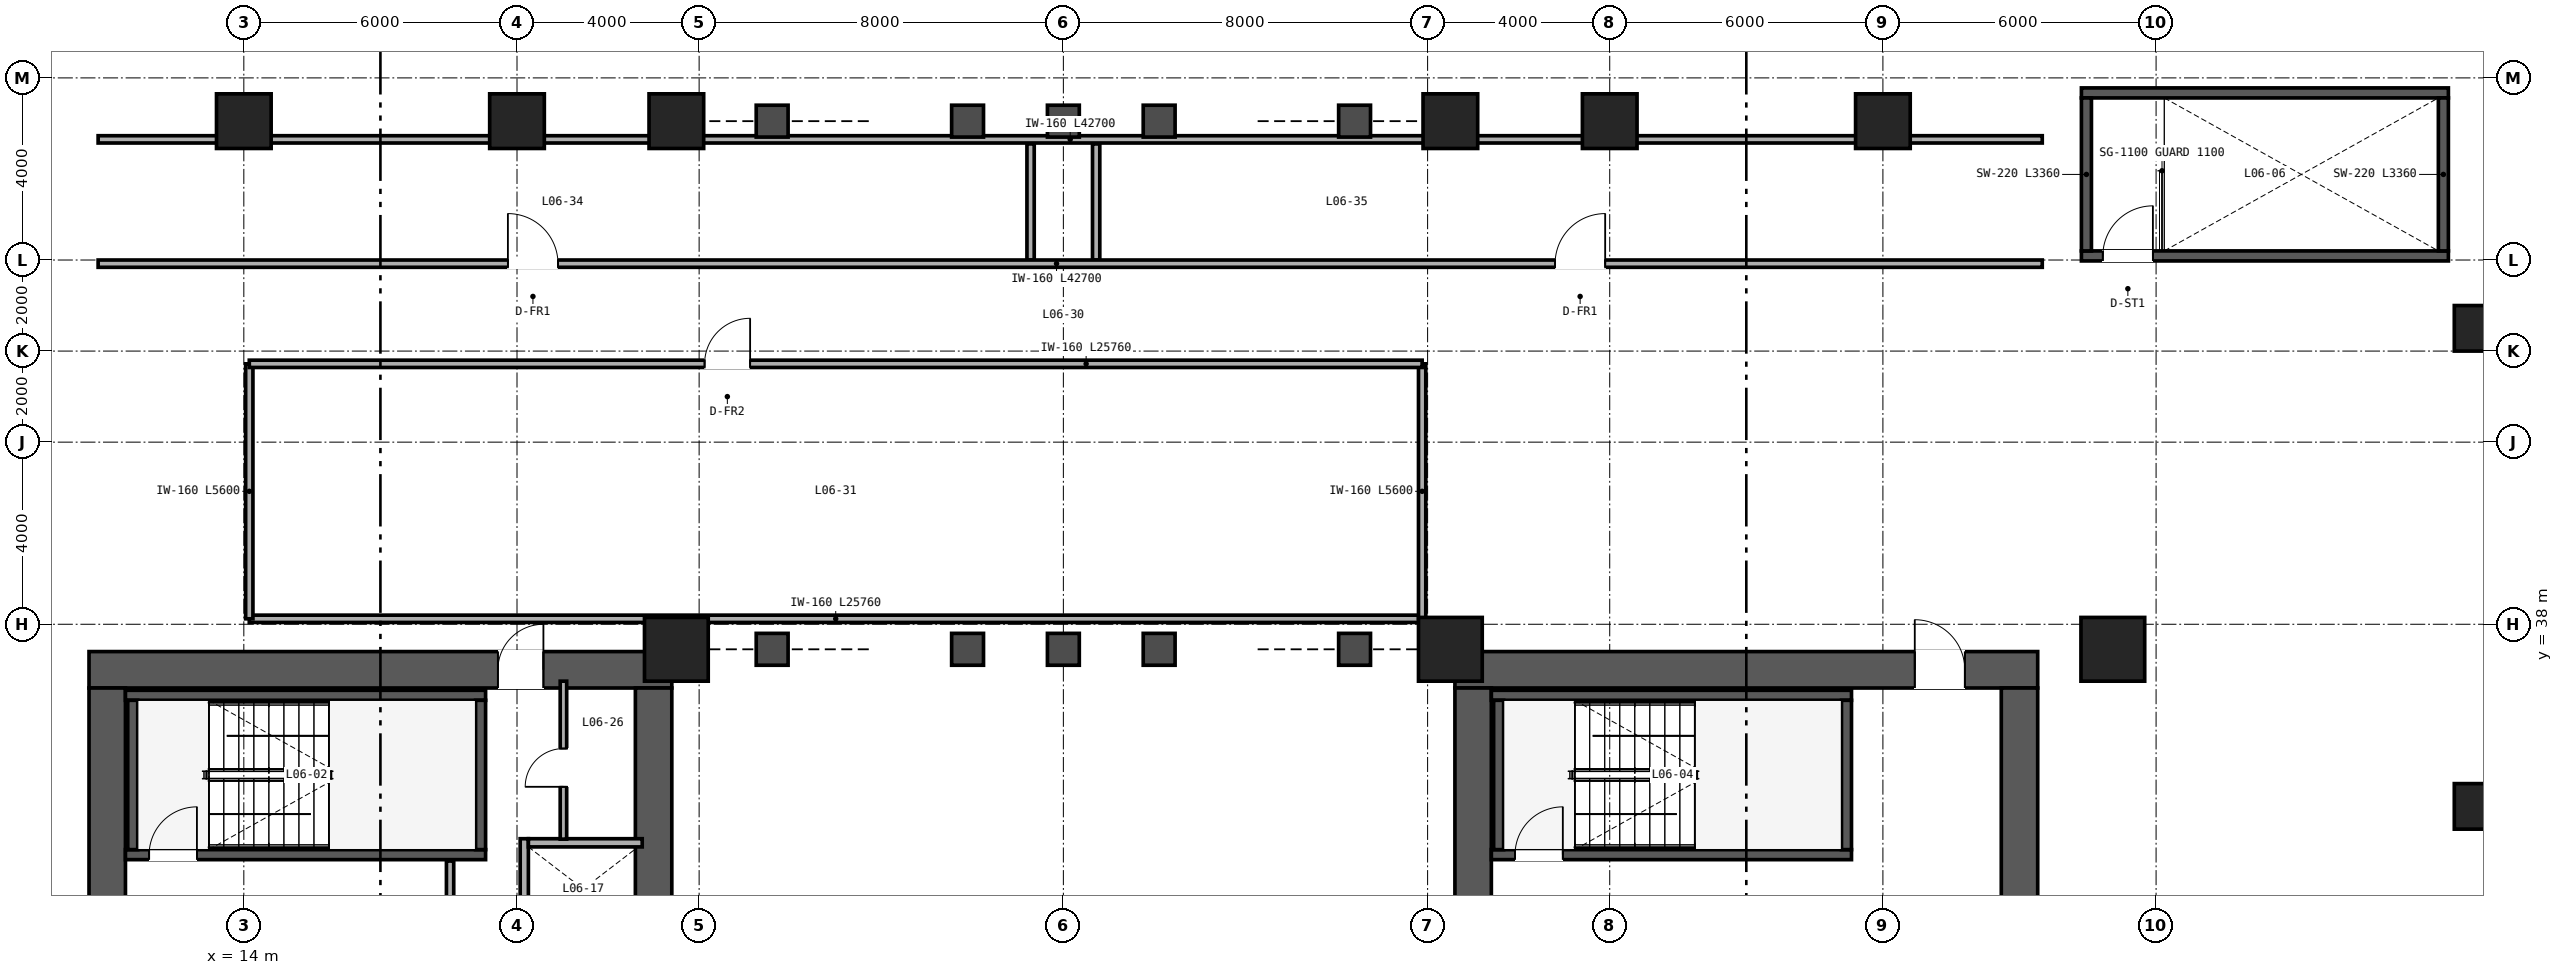
"""IFC4 building model, lengths in metres.
Left out: names, types, materials, properties, quantities, classifications, styles, units other than length and angle.
Written with IfcOpenShell. Run it as: python <this file> out.ifc"""

import sys

from ifc_helpers import new_model, si_unit, direction, frame, frame_2d, origin, origin_2d, place, context, subcontext, project, spatial, rectangle, extrude, source, transform, mapped, element, fill, save


model = new_model("IFC4")
c1 = context("Model", 3, precision=1e-05, world=origin(), true_north=direction((0.0, 1.0)))
c2 = subcontext(c1, "Body", "Model", "MODEL_VIEW")
j1 = project(units=[si_unit("LENGTHUNIT", "METRE"), si_unit("PLANEANGLEUNIT", "RADIAN")], contexts=[c1])
p1 = place(None, origin())
s1 = spatial("IfcSite", under=j1, at=p1, CompositionType="ELEMENT")
p2 = place(p1, origin())
s2 = spatial("IfcBuilding", under=s1, at=p2, CompositionType="ELEMENT")
p3 = place(p2, frame((0.0, 0.0, 28.8)))
s3 = spatial("IfcBuildingStorey", under=s2, at=p3, CompositionType="ELEMENT", Elevation=28.8)
p4 = place(p3, frame((10.6, 37.0, 0.0), z_axis=(0.0, 0.0, 1.0), x_axis=(1.0, 0.0, 0.0)))
e1 = element("IfcWall", 1, at=p4, inside=s3, PredefinedType="SHEAR", context=c2, shape_type="SweptSolid", body=[
    extrude(rectangle(XDim=12.8, YDim=0.8, at=frame_2d((6.4, 0.0))), origin(), (0.0, 0.0, 1.0), 5.75),
])
p5 = place(p4, frame((8.98, 0.0, 0.0)))
e2 = element("IfcOpeningElement", 2, at=p5, cuts=e1, PredefinedType="OPENING", context=c2, shape_type="SweptSolid", body=[
    extrude(rectangle(XDim=1.0, YDim=2.15, at=frame_2d((0.5, 1.075))), frame((0.0, 0.41, 0.0), z_axis=(0.0, -1.0, 0.0), x_axis=(1.0, 0.0, 0.0)), (0.0, 0.0, 1.0), 0.82),
])
for number, where, z_axis, x_axis in (
    (3, (11.0, 15.4, 0.0), (0.0, 0.0, 1.0), (0.0, 1.0, 0.0)),
    (4, (23.0, 15.4, 0.0), (0.0, 0.0, 1.0), (0.0, 1.0, 0.0)),
):
    element("IfcWall", number, at=place(p3, frame(where, z_axis=z_axis, x_axis=x_axis)), inside=s3, PredefinedType="SHEAR", context=c2, shape_type="SweptSolid", body=[
        extrude(rectangle(XDim=21.2, YDim=0.8, at=frame_2d((10.6, 0.0))), origin(), (0.0, 0.0, 1.0), 5.75),
    ])
p6 = place(p3, frame((40.6, 37.0, 0.0), z_axis=(0.0, 0.0, 1.0), x_axis=(1.0, 0.0, 0.0)))
e5 = element("IfcWall", 5, at=p6, inside=s3, PredefinedType="SHEAR", context=c2, shape_type="SweptSolid", body=[
    extrude(rectangle(XDim=12.8, YDim=0.8, at=frame_2d((6.4, 0.0))), origin(), (0.0, 0.0, 1.0), 5.75),
])
p7 = place(p6, frame((10.1, 0.0, 0.0)))
e6 = element("IfcOpeningElement", 6, at=p7, cuts=e5, PredefinedType="OPENING", context=c2, shape_type="SweptSolid", body=[
    extrude(rectangle(XDim=1.1, YDim=2.15, at=frame_2d((0.55, 1.075))), frame((0.0, 0.41, 0.0), z_axis=(0.0, -1.0, 0.0), x_axis=(1.0, 0.0, 0.0)), (0.0, 0.0, 1.0), 0.82),
])
for number, where, z_axis, x_axis in (
    (7, (41.0, 15.4, 0.0), (0.0, 0.0, 1.0), (0.0, 1.0, 0.0)),
    (8, (53.0, 15.4, 0.0), (0.0, 0.0, 1.0), (0.0, 1.0, 0.0)),
):
    element("IfcWall", number, at=place(p3, frame(where, z_axis=z_axis, x_axis=x_axis)), inside=s3, PredefinedType="SHEAR", context=c2, shape_type="SweptSolid", body=[
        extrude(rectangle(XDim=21.2, YDim=0.8, at=frame_2d((10.6, 0.0))), origin(), (0.0, 0.0, 1.0), 5.75),
    ])
p8 = place(p3, frame((11.4, 32.94, 0.0), z_axis=(0.0, 0.0, 1.0), x_axis=(1.0, 0.0, 0.0)))
e9 = element("IfcWall", 9, at=p8, inside=s3, PredefinedType="SHEAR", context=c2, shape_type="SweptSolid", body=[
    extrude(rectangle(XDim=7.91, YDim=0.22, at=frame_2d((3.955, 0.0))), origin(), (0.0, 0.0, 1.0), 5.8),
])
p9 = place(p8, frame((0.52, 0.0, 0.0)))
e10 = element("IfcOpeningElement", 10, at=p9, cuts=e9, PredefinedType="OPENING", context=c2, shape_type="SweptSolid", body=[
    extrude(rectangle(XDim=1.05, YDim=2.15, at=frame_2d((0.525, 1.075))), frame((0.0, 0.12, 0.0), z_axis=(0.0, -1.0, 0.0), x_axis=(1.0, 0.0, 0.0)), (0.0, 0.0, 1.0), 0.24),
])
p10 = place(p3, frame((11.4, 36.44, 0.0), z_axis=(0.0, 0.0, 1.0), x_axis=(1.0, 0.0, 0.0)))
e11 = element("IfcWall", 11, at=p10, inside=s3, PredefinedType="SHEAR", context=c2, shape_type="SweptSolid", body=[
    extrude(rectangle(XDim=7.91, YDim=0.22, at=frame_2d((3.955, 0.0))), origin(), (0.0, 0.0, 1.0), 5.8),
])
for number, where, z_axis, x_axis in (
    (12, (11.56, 33.05, 0.0), (0.0, 0.0, 1.0), (0.0, 1.0, 0.0)),
    (13, (19.2, 33.05, 0.0), (0.0, 0.0, 1.0), (0.0, 1.0, 0.0)),
):
    element("IfcWall", number, at=place(p3, frame(where, z_axis=z_axis, x_axis=x_axis)), inside=s3, PredefinedType="SHEAR", context=c2, shape_type="SweptSolid", body=[
        extrude(rectangle(XDim=3.28, YDim=0.22, at=frame_2d((1.64, 0.0))), origin(), (0.0, 0.0, 1.0), 5.8),
    ])
p11 = place(p3, frame((41.4, 32.94, 0.0), z_axis=(0.0, 0.0, 1.0), x_axis=(1.0, 0.0, 0.0)))
e14 = element("IfcWall", 14, at=p11, inside=s3, PredefinedType="SHEAR", context=c2, shape_type="SweptSolid", body=[
    extrude(rectangle(XDim=7.91, YDim=0.22, at=frame_2d((3.955, 0.0))), origin(), (0.0, 0.0, 1.0), 5.8),
])
p12 = place(p11, frame((0.52, 0.0, 0.0)))
e15 = element("IfcOpeningElement", 15, at=p12, cuts=e14, PredefinedType="OPENING", context=c2, shape_type="SweptSolid", body=[
    extrude(rectangle(XDim=1.05, YDim=2.15, at=frame_2d((0.525, 1.075))), frame((0.0, 0.12, 0.0), z_axis=(0.0, -1.0, 0.0), x_axis=(1.0, 0.0, 0.0)), (0.0, 0.0, 1.0), 0.24),
])
p13 = place(p3, frame((41.4, 36.44, 0.0), z_axis=(0.0, 0.0, 1.0), x_axis=(1.0, 0.0, 0.0)))
e16 = element("IfcWall", 16, at=p13, inside=s3, PredefinedType="SHEAR", context=c2, shape_type="SweptSolid", body=[
    extrude(rectangle(XDim=7.91, YDim=0.22, at=frame_2d((3.955, 0.0))), origin(), (0.0, 0.0, 1.0), 5.8),
])
for number, where, z_axis, x_axis in (
    (17, (41.56, 33.05, 0.0), (0.0, 0.0, 1.0), (0.0, 1.0, 0.0)),
    (18, (49.2, 33.05, 0.0), (0.0, 0.0, 1.0), (0.0, 1.0, 0.0)),
):
    element("IfcWall", number, at=place(p3, frame(where, z_axis=z_axis, x_axis=x_axis)), inside=s3, PredefinedType="SHEAR", context=c2, shape_type="SweptSolid", body=[
        extrude(rectangle(XDim=3.28, YDim=0.22, at=frame_2d((1.64, 0.0))), origin(), (0.0, 0.0, 1.0), 5.8),
    ])
p14 = place(p3, frame((54.36, 46.09, 0.0), z_axis=(0.0, 0.0, 1.0), x_axis=(1.0, 0.0, 0.0)))
e19 = element("IfcWall", 19, at=p14, inside=s3, PredefinedType="SHEAR", context=c2, shape_type="SweptSolid", body=[
    extrude(rectangle(XDim=8.06, YDim=0.22, at=frame_2d((4.03, 0.0))), origin(), (0.0, 0.0, 1.0), 5.8),
])
p15 = place(p14, frame((0.47, 0.0, 0.0)))
e20 = element("IfcOpeningElement", 20, at=p15, cuts=e19, PredefinedType="OPENING", context=c2, shape_type="SweptSolid", body=[
    extrude(rectangle(XDim=1.1, YDim=2.15, at=frame_2d((0.55, 1.075))), frame((0.0, 0.12, 0.0), z_axis=(0.0, -1.0, 0.0), x_axis=(1.0, 0.0, 0.0)), (0.0, 0.0, 1.0), 0.24),
])
p16 = place(p3, frame((54.36, 49.67, 0.0), z_axis=(0.0, 0.0, 1.0), x_axis=(1.0, 0.0, 0.0)))
e21 = element("IfcWall", 21, at=p16, inside=s3, PredefinedType="SHEAR", context=c2, shape_type="SweptSolid", body=[
    extrude(rectangle(XDim=8.06, YDim=0.22, at=frame_2d((4.03, 0.0))), origin(), (0.0, 0.0, 1.0), 5.8),
])
for number, where, z_axis, x_axis in (
    (22, (54.47, 46.2, 0.0), (0.0, 0.0, 1.0), (0.0, 1.0, 0.0)),
    (23, (62.31, 46.2, 0.0), (0.0, 0.0, 1.0), (0.0, 1.0, 0.0)),
):
    element("IfcWall", number, at=place(p3, frame(where, z_axis=z_axis, x_axis=x_axis)), inside=s3, PredefinedType="SHEAR", context=c2, shape_type="SweptSolid", body=[
        extrude(rectangle(XDim=3.36, YDim=0.22, at=frame_2d((1.68, 0.0))), origin(), (0.0, 0.0, 1.0), 5.8),
    ])
m1 = source(origin(), c2, "Body", "SweptSolid", [
    extrude(rectangle(XDim=1.0, YDim=1.0, at=origin_2d()), origin(), (0.0, 0.0, 1.0), 5.75),
])
for number, where, z_axis, x_axis in (
    (24, (63.05, 34.0, 0.0), (0.0, 0.0, 1.0), (1.0, 0.0, 0.0)),
    (25, (63.05, 44.5, 0.0), (0.0, 0.0, 1.0), (1.0, 0.0, 0.0)),
):
    element("IfcColumn", number, at=place(p3, frame(where, z_axis=z_axis, x_axis=x_axis)), inside=s3, PredefinedType="COLUMN", context=c2, shape_type="MappedRepresentation", body=[
        mapped(m1, transform((0.0, 0.0, 0.0), scale=1.0)),
    ])
m2 = source(origin(), c2, "Body", "SweptSolid", [
    extrude(rectangle(XDim=1.4, YDim=1.4, at=origin_2d()), origin(), (0.0, 0.0, 1.0), 5.75),
])
for number, where, z_axis, x_axis in (
    (26, (23.5, 37.45, 0.0), (0.0, 0.0, 1.0), (1.0, 0.0, 0.0)),
    (27, (40.5, 37.45, 0.0), (0.0, 0.0, 1.0), (1.0, 0.0, 0.0)),
    (28, (55.05, 37.45, 0.0), (0.0, 0.0, 1.0), (1.0, 0.0, 0.0)),
):
    element("IfcColumn", number, at=place(p3, frame(where, z_axis=z_axis, x_axis=x_axis)), inside=s3, PredefinedType="COLUMN", context=c2, shape_type="MappedRepresentation", body=[
        mapped(m2, transform((0.0, 0.0, 0.0), scale=1.0)),
    ])
m3 = source(origin(), c2, "Body", "SweptSolid", [
    extrude(rectangle(XDim=1.2, YDim=1.2, at=origin_2d()), origin(), (0.0, 0.0, 1.0), 5.75),
])
for number, where, z_axis, x_axis in (
    (29, (14.0, 49.05, 0.0), (0.0, 0.0, 1.0), (1.0, 0.0, 0.0)),
    (30, (20.0, 49.05, 0.0), (0.0, 0.0, 1.0), (1.0, 0.0, 0.0)),
    (31, (23.5, 49.05, 0.0), (0.0, 0.0, 1.0), (1.0, 0.0, 0.0)),
    (32, (40.5, 49.05, 0.0), (0.0, 0.0, 1.0), (1.0, 0.0, 0.0)),
    (33, (44.0, 49.05, 0.0), (0.0, 0.0, 1.0), (1.0, 0.0, 0.0)),
    (34, (50.0, 49.05, 0.0), (0.0, 0.0, 1.0), (1.0, 0.0, 0.0)),
):
    element("IfcColumn", number, at=place(p3, frame(where, z_axis=z_axis, x_axis=x_axis)), inside=s3, PredefinedType="COLUMN", context=c2, shape_type="MappedRepresentation", body=[
        mapped(m3, transform((0.0, 0.0, 0.0), scale=1.0)),
    ])
p17 = place(p3, frame((20.16, 29.0, 0.0), z_axis=(0.0, 0.0, 1.0), x_axis=(0.0, 1.0, 0.0)))
e35 = element("IfcWall", 35, at=p17, inside=s3, PredefinedType="SOLIDWALL", context=c2, shape_type="SweptSolid", body=[
    extrude(rectangle(XDim=4.29, YDim=0.18, at=frame_2d((2.145, 0.0))), origin(), (0.0, 0.0, 1.0), 5.75),
])
p18 = place(p3, frame((20.25, 33.2, 0.0), z_axis=(0.0, 0.0, 1.0), x_axis=(1.0, 0.0, 0.0)))
e36 = element("IfcWall", 36, at=p18, inside=s3, PredefinedType="SOLIDWALL", context=c2, shape_type="SweptSolid", body=[
    extrude(rectangle(XDim=2.5, YDim=0.18, at=frame_2d((1.25, 0.0))), origin(), (0.0, 0.0, 1.0), 5.75),
])
p19 = place(p3, frame((18.53, 28.9, 0.0), z_axis=(0.0, 0.0, 1.0), x_axis=(0.0, 1.0, 0.0)))
e37 = element("IfcWall", 37, at=p19, inside=s3, PredefinedType="PARTITIONING", context=c2, shape_type="SweptSolid", body=[
    extrude(rectangle(XDim=3.9, YDim=0.16, at=frame_2d((1.95, 0.0))), origin(), (0.0, 0.0, 1.0), 5.75),
])
p20 = place(p19, frame((1.5, 0.0, 0.0)))
e38 = element("IfcOpeningElement", 38, at=p20, cuts=e37, PredefinedType="OPENING", context=c2, shape_type="SweptSolid", body=[
    extrude(rectangle(XDim=1.0, YDim=2.15, at=frame_2d((0.5, 1.075))), frame((0.0, 0.09, 0.0), z_axis=(0.0, -1.0, 0.0), x_axis=(1.0, 0.0, 0.0)), (0.0, 0.0, 1.0), 0.18),
])
p21 = place(p3, frame((21.02, 33.28, 0.0), z_axis=(0.0, 0.0, 1.0), x_axis=(0.0, 1.0, 0.0)))
e39 = element("IfcWall", 39, at=p21, inside=s3, PredefinedType="PARTITIONING", context=c2, shape_type="SweptSolid", body=[
    extrude(rectangle(XDim=3.47, YDim=0.142, at=frame_2d((1.735, 0.0))), origin(), (0.0, 0.0, 1.0), 5.75),
])
p22 = place(p21, frame((1.15, 0.0, 0.0)))
e40 = element("IfcOpeningElement", 40, at=p22, cuts=e39, PredefinedType="OPENING", context=c2, shape_type="SweptSolid", body=[
    extrude(rectangle(XDim=0.84, YDim=2.1, at=frame_2d((0.42, 1.05))), frame((0.0, 0.081, 0.0), z_axis=(0.0, -1.0, 0.0), x_axis=(1.0, 0.0, 0.0)), (0.0, 0.0, 1.0), 0.162),
])
p23 = place(p3, frame((14.12, 38.12, 0.0), z_axis=(0.0, 0.0, 1.0), x_axis=(1.0, 0.0, 0.0)))
e41 = element("IfcWall", 41, at=p23, inside=s3, PredefinedType="PARTITIONING", context=c2, shape_type="SweptSolid", body=[
    extrude(rectangle(XDim=25.76, YDim=0.16, at=frame_2d((12.88, 0.0))), origin(), (0.0, 0.0, 1.0), 4.971),
])
for number, where, z_axis, x_axis in (
    (42, (14.12, 38.12, 0.0), (0.0, 0.0, 1.0), (0.0, 1.0, 0.0)),
    (43, (39.88, 38.12, 0.0), (0.0, 0.0, 1.0), (0.0, 1.0, 0.0)),
):
    element("IfcWall", number, at=place(p3, frame(where, z_axis=z_axis, x_axis=x_axis)), inside=s3, PredefinedType="PARTITIONING", context=c2, shape_type="SweptSolid", body=[
        extrude(rectangle(XDim=5.6, YDim=0.16, at=frame_2d((2.8, 0.0))), origin(), (0.0, 0.0, 1.0), 5.75),
    ])
p24 = place(p3, frame((14.12, 43.72, 0.0), z_axis=(0.0, 0.0, 1.0), x_axis=(1.0, 0.0, 0.0)))
e44 = element("IfcWall", 44, at=p24, inside=s3, PredefinedType="PARTITIONING", context=c2, shape_type="SweptSolid", body=[
    extrude(rectangle(XDim=25.76, YDim=0.16, at=frame_2d((12.88, 0.0))), origin(), (0.0, 0.0, 1.0), 4.971),
])
p25 = place(p24, frame((10.0, 0.0, 0.0)))
e45 = element("IfcOpeningElement", 45, at=p25, cuts=e44, PredefinedType="OPENING", context=c2, shape_type="SweptSolid", body=[
    extrude(rectangle(XDim=1.0, YDim=2.15, at=frame_2d((0.5, 1.075))), frame((0.0, 0.09, 0.0), z_axis=(0.0, -1.0, 0.0), x_axis=(1.0, 0.0, 0.0)), (0.0, 0.0, 1.0), 0.18),
])
p26 = place(p3, frame((10.8, 48.65, 0.0), z_axis=(0.0, 0.0, 1.0), x_axis=(1.0, 0.0, 0.0)))
e46 = element("IfcWall", 46, at=p26, inside=s3, PredefinedType="PARTITIONING", context=c2, shape_type="SweptSolid", body=[
    extrude(rectangle(XDim=42.7, YDim=0.16, at=frame_2d((21.35, 0.0))), origin(), (0.0, 0.0, 1.0), 4.971),
])
for number, where, z_axis, x_axis in (
    (47, (31.28, 46.0, 0.0), (0.0, 0.0, 1.0), (0.0, 1.0, 0.0)),
    (48, (32.72, 46.0, 0.0), (0.0, 0.0, 1.0), (0.0, 1.0, 0.0)),
):
    element("IfcWall", number, at=place(p3, frame(where, z_axis=z_axis, x_axis=x_axis)), inside=s3, PredefinedType="PARTITIONING", context=c2, shape_type="SweptSolid", body=[
        extrude(rectangle(XDim=2.55, YDim=0.16, at=frame_2d((1.275, 0.0))), origin(), (0.0, 0.0, 1.0), 5.75),
    ])
p27 = place(p3, frame((10.8, 45.92, 0.0), z_axis=(0.0, 0.0, 1.0), x_axis=(1.0, 0.0, 0.0)))
e49 = element("IfcWall", 49, at=p27, inside=s3, PredefinedType="PARTITIONING", context=c2, shape_type="SweptSolid", body=[
    extrude(rectangle(XDim=42.7, YDim=0.16, at=frame_2d((21.35, 0.0))), origin(), (0.0, 0.0, 1.0), 4.971),
])
p28 = place(p27, frame((9.0, 0.0, 0.0)))
e50 = element("IfcOpeningElement", 50, at=p28, cuts=e49, PredefinedType="OPENING", context=c2, shape_type="SweptSolid", body=[
    extrude(rectangle(XDim=1.1, YDim=2.15, at=frame_2d((0.55, 1.075))), frame((0.0, 0.09, 0.0), z_axis=(0.0, -1.0, 0.0), x_axis=(1.0, 0.0, 0.0)), (0.0, 0.0, 1.0), 0.18),
])
p29 = place(p27, frame((32.0, 0.0, 0.0)))
e51 = element("IfcOpeningElement", 51, at=p29, cuts=e49, PredefinedType="OPENING", context=c2, shape_type="SweptSolid", body=[
    extrude(rectangle(XDim=1.1, YDim=2.15, at=frame_2d((0.55, 1.075))), frame((0.0, 0.09, 0.0), z_axis=(0.0, -1.0, 0.0), x_axis=(1.0, 0.0, 0.0)), (0.0, 0.0, 1.0), 0.18),
])
m4 = source(origin(), c2, "Body", "SweptSolid", [
    extrude(rectangle(XDim=1.05, YDim=2.15, at=frame_2d((0.525, 1.075))), frame((0.0, 0.025, 0.0), z_axis=(0.0, -1.0, 0.0), x_axis=(1.0, 0.0, 0.0)), (0.0, 0.0, 1.0), 0.05),
])
p30 = place(p9, origin())
e52 = element("IfcDoor", 52, at=p30, inside=s3, OperationType="SINGLE_SWING_RIGHT", PredefinedType="DOOR", context=c2, shape_type="MappedRepresentation", body=[
    mapped(m4, transform((0.0, 0.0, 0.0), scale=1.0)),
])
fill(e10, e52)
p31 = place(p12, origin())
e53 = element("IfcDoor", 53, at=p31, inside=s3, OperationType="SINGLE_SWING_RIGHT", PredefinedType="DOOR", context=c2, shape_type="MappedRepresentation", body=[
    mapped(m4, transform((0.0, 0.0, 0.0), scale=1.0)),
])
fill(e15, e53)
m5 = source(origin(), c2, "Body", "SweptSolid", [
    extrude(rectangle(XDim=1.1, YDim=2.15, at=frame_2d((0.55, 1.075))), frame((0.0, 0.025, 0.0), z_axis=(0.0, -1.0, 0.0), x_axis=(1.0, 0.0, 0.0)), (0.0, 0.0, 1.0), 0.05),
])
p32 = place(p15, origin())
e54 = element("IfcDoor", 54, at=p32, inside=s3, OperationType="SINGLE_SWING_RIGHT", PredefinedType="DOOR", context=c2, shape_type="MappedRepresentation", body=[
    mapped(m5, transform((0.0, 0.0, 0.0), scale=1.0)),
])
fill(e20, e54)
m6 = source(origin(), c2, "Body", "SweptSolid", [
    extrude(rectangle(XDim=0.84, YDim=2.1, at=frame_2d((0.42, 1.05))), frame((0.0, 0.025, 0.0), z_axis=(0.0, -1.0, 0.0), x_axis=(1.0, 0.0, 0.0)), (0.0, 0.0, 1.0), 0.05),
])
p33 = place(p22, origin())
e55 = element("IfcDoor", 55, at=p33, inside=s3, OperationType="SINGLE_SWING_LEFT", PredefinedType="DOOR", context=c2, shape_type="MappedRepresentation", body=[
    mapped(m6, transform((0.0, 0.0, 0.0), scale=1.0)),
])
fill(e40, e55)
m7 = source(origin(), c2, "Body", "SweptSolid", [
    extrude(rectangle(XDim=1.0, YDim=2.15, at=frame_2d((0.5, 1.075))), frame((0.0, 0.025, 0.0), z_axis=(0.0, -1.0, 0.0), x_axis=(1.0, 0.0, 0.0)), (0.0, 0.0, 1.0), 0.05),
])
p34 = place(p5, origin())
e56 = element("IfcDoor", 56, at=p34, inside=s3, OperationType="SINGLE_SWING_RIGHT", PredefinedType="DOOR", context=c2, shape_type="MappedRepresentation", body=[
    mapped(m7, transform((0.0, 0.0, 0.0), scale=1.0)),
])
fill(e2, e56)
p35 = place(p7, origin())
e57 = element("IfcDoor", 57, at=p35, inside=s3, OperationType="SINGLE_SWING_LEFT", PredefinedType="DOOR", context=c2, shape_type="MappedRepresentation", body=[
    mapped(m5, transform((0.0, 0.0, 0.0), scale=1.0)),
])
fill(e6, e57)
p36 = place(p25, origin())
e58 = element("IfcDoor", 58, at=p36, inside=s3, OperationType="SINGLE_SWING_RIGHT", PredefinedType="DOOR", context=c2, shape_type="MappedRepresentation", body=[
    mapped(m7, transform((0.0, 0.0, 0.0), scale=1.0)),
])
fill(e45, e58)
p37 = place(p28, origin())
e59 = element("IfcDoor", 59, at=p37, inside=s3, OperationType="SINGLE_SWING_LEFT", PredefinedType="DOOR", context=c2, shape_type="MappedRepresentation", body=[
    mapped(m5, transform((0.0, 0.0, 0.0), scale=1.0)),
])
fill(e50, e59)
p38 = place(p29, origin())
e60 = element("IfcDoor", 60, at=p38, inside=s3, OperationType="SINGLE_SWING_RIGHT", PredefinedType="DOOR", context=c2, shape_type="MappedRepresentation", body=[
    mapped(m5, transform((0.0, 0.0, 0.0), scale=1.0)),
])
fill(e51, e60)
save(model, sys.argv[1])
